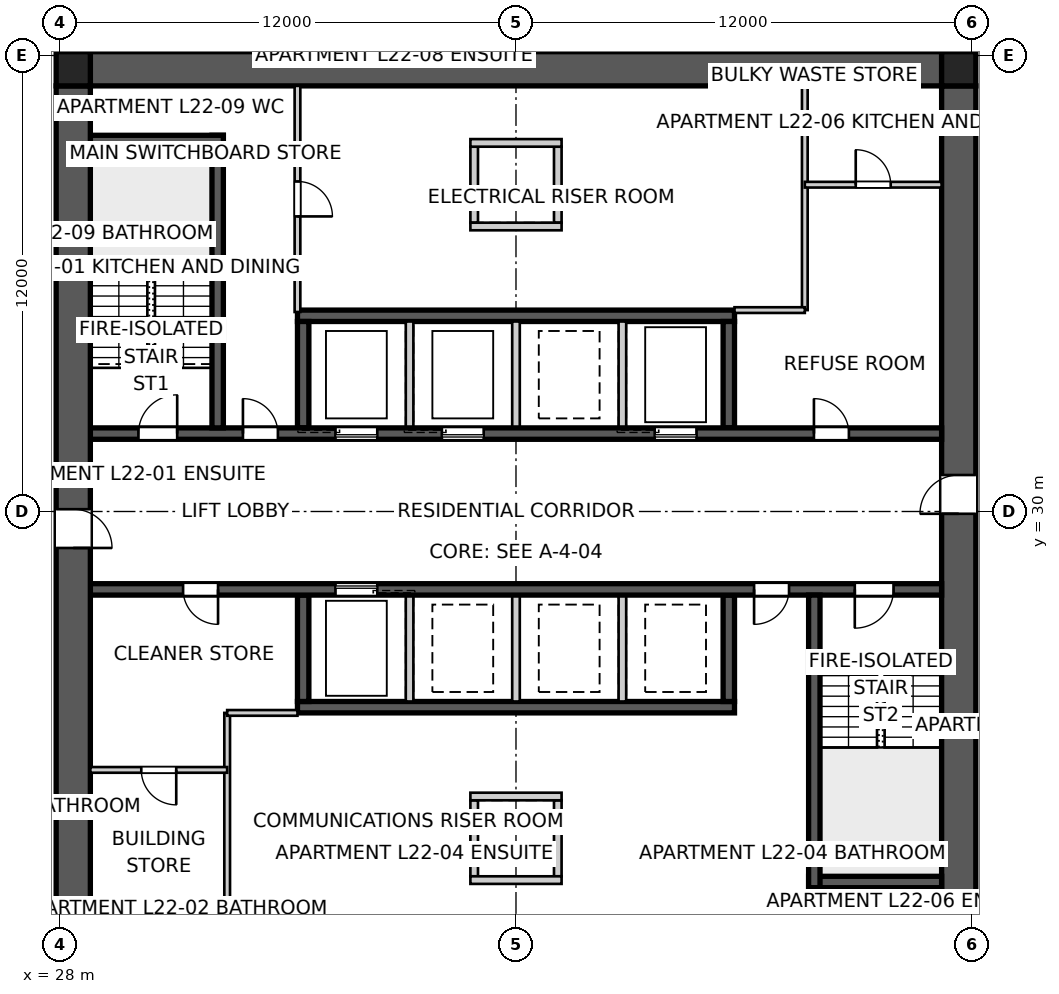
"""IFC4 building model, lengths in metres.
Left out: names, types, materials, properties, quantities, classifications, styles, units other than length and angle.
Written with IfcOpenShell. Run it as: python <this file> out.ifc"""

import sys

from ifc_helpers import new_model, si_unit, direction, frame, frame_2d, origin, origin_2d, place, context, subcontext, project, spatial, polyline, rectangle, outline, extrude, element, fill, save


model = new_model("IFC4")
c1 = context("Model", 3, precision=1e-05, world=origin(), true_north=direction((0.0, 1.0)))
c2 = subcontext(c1, "Body", "Model", "MODEL_VIEW")
j1 = project(units=[si_unit("LENGTHUNIT", "METRE"), si_unit("PLANEANGLEUNIT", "RADIAN")], contexts=[c1])
p1 = place(None, origin())
s1 = spatial("IfcSite", under=j1, at=p1, CompositionType="ELEMENT")
p2 = place(p1, origin())
s2 = spatial("IfcBuilding", under=s1, at=p2, CompositionType="ELEMENT")
p3 = place(p2, frame((0.0, 0.0, 82.8)))
s3 = spatial("IfcBuildingStorey", under=s2, at=p3, CompositionType="ELEMENT", Elevation=82.8)
p4 = place(p3, frame((28.8, 41.65, 0.0), z_axis=(0.0, 0.0, 1.0), x_axis=(1.0, 0.0, 0.0)))
e1 = element("IfcWall", 1, at=p4, inside=s3, PredefinedType="SHEAR", context=c2, shape_type="SweptSolid", body=[
    extrude(outline(polyline([(0.0, -0.45), (22.4, -0.45), (22.4, -0.025), (22.85, -0.025), (22.85, 0.025), (22.4, 0.025), (22.4, 0.45), (0.0, 0.45), (0.0, 0.025), (-0.45, 0.025), (-0.45, -0.025), (0.0, -0.025), (0.0, -0.45)])), origin(), (0.0, 0.0, 1.0), 3.4),
])
p5 = place(p3, frame((51.65, 18.8, 0.0), z_axis=(0.0, 0.0, 1.0), x_axis=(0.0, 1.0, 0.0)))
e2 = element("IfcWall", 2, at=p5, inside=s3, PredefinedType="SHEAR", context=c2, shape_type="SweptSolid", body=[
    extrude(outline(polyline([(0.0, -0.45), (22.4, -0.45), (22.4, -0.025), (22.85, -0.025), (22.85, 0.025), (22.4, 0.025), (22.4, 0.45), (0.0, 0.45), (0.0, 0.025), (-0.45, 0.025), (-0.45, -0.025), (0.0, -0.025), (0.0, -0.45)])), origin(), (0.0, 0.0, 1.0), 3.4),
])
p6 = place(p5, frame((11.14, 0.0, 0.0)))
e3 = element("IfcOpeningElement", 3, at=p6, cuts=e2, PredefinedType="OPENING", context=c2, shape_type="SweptSolid", body=[
    extrude(rectangle(XDim=1.02, YDim=2.4, at=frame_2d((0.51, 1.2))), frame((0.0, 0.46, 0.0), z_axis=(0.0, -1.0, 0.0), x_axis=(1.0, 0.0, 0.0)), (0.0, 0.0, 1.0), 0.92),
])
p7 = place(p3, frame((28.35, 41.2, 0.0), z_axis=(0.0, 0.0, 1.0), x_axis=(0.0, -1.0, 0.0)))
e4 = element("IfcWall", 4, at=p7, inside=s3, PredefinedType="SHEAR", context=c2, shape_type="SweptSolid", body=[
    extrude(outline(polyline([(0.0, -0.45), (22.4, -0.45), (22.4, -0.025), (22.85, -0.025), (22.85, 0.025), (22.4, 0.025), (22.4, 0.45), (0.0, 0.45), (0.0, 0.025), (-0.45, 0.025), (-0.45, -0.025), (0.0, -0.025), (0.0, -0.45)])), origin(), (0.0, 0.0, 1.0), 3.4),
])
p8 = place(p7, frame((11.14, 0.0, 0.0)))
e5 = element("IfcOpeningElement", 5, at=p8, cuts=e4, PredefinedType="OPENING", context=c2, shape_type="SweptSolid", body=[
    extrude(rectangle(XDim=1.02, YDim=2.4, at=frame_2d((0.51, 1.2))), frame((0.0, 0.46, 0.0), z_axis=(0.0, -1.0, 0.0), x_axis=(1.0, 0.0, 0.0)), (0.0, 0.0, 1.0), 0.92),
])
p9 = place(p3, frame((28.8, 32.05, 0.0), z_axis=(0.0, 0.0, 1.0), x_axis=(1.0, 0.0, 0.0)))
e6 = element("IfcWall", 6, at=p9, inside=s3, PredefinedType="SHEAR", context=c2, shape_type="SweptSolid", body=[
    extrude(rectangle(XDim=22.4, YDim=0.3, at=frame_2d((11.2, 0.0))), origin(), (0.0, 0.0, 1.0), 3.4),
])
p10 = place(p9, frame((19.04, 0.0, 0.0)))
e7 = element("IfcOpeningElement", 7, at=p10, cuts=e6, PredefinedType="OPENING", context=c2, shape_type="SweptSolid", body=[
    extrude(rectangle(XDim=0.92, YDim=2.1, at=frame_2d((0.46, 1.05))), frame((0.0, 0.16, 0.0), z_axis=(0.0, -1.0, 0.0), x_axis=(1.0, 0.0, 0.0)), (0.0, 0.0, 1.0), 0.32),
])
p11 = place(p9, frame((1.265, 0.0, 0.0)))
e8 = element("IfcOpeningElement", 8, at=p11, cuts=e6, PredefinedType="OPENING", context=c2, shape_type="SweptSolid", body=[
    extrude(rectangle(XDim=1.02, YDim=2.1, at=frame_2d((0.51, 1.05))), frame((0.0, 0.16, 0.0), z_axis=(0.0, -1.0, 0.0), x_axis=(1.0, 0.0, 0.0)), (0.0, 0.0, 1.0), 0.32),
])
p12 = place(p9, frame((4.015, 0.0, 0.0)))
e9 = element("IfcOpeningElement", 9, at=p12, cuts=e6, PredefinedType="OPENING", context=c2, shape_type="SweptSolid", body=[
    extrude(rectangle(XDim=0.92, YDim=2.1, at=frame_2d((0.46, 1.05))), frame((0.0, 0.16, 0.0), z_axis=(0.0, -1.0, 0.0), x_axis=(1.0, 0.0, 0.0)), (0.0, 0.0, 1.0), 0.32),
])
p13 = place(p9, frame((6.45, 0.0, 0.0)))
e10 = element("IfcOpeningElement", 10, at=p13, cuts=e6, PredefinedType="OPENING", context=c2, shape_type="SweptSolid", body=[
    extrude(rectangle(XDim=1.1, YDim=2.1, at=frame_2d((0.55, 1.05))), frame((0.0, 0.16, 0.0), z_axis=(0.0, -1.0, 0.0), x_axis=(1.0, 0.0, 0.0)), (0.0, 0.0, 1.0), 0.32),
])
p14 = place(p9, frame((9.25, 0.0, 0.0)))
e11 = element("IfcOpeningElement", 11, at=p14, cuts=e6, PredefinedType="OPENING", context=c2, shape_type="SweptSolid", body=[
    extrude(rectangle(XDim=1.1, YDim=2.1, at=frame_2d((0.55, 1.05))), frame((0.0, 0.16, 0.0), z_axis=(0.0, -1.0, 0.0), x_axis=(1.0, 0.0, 0.0)), (0.0, 0.0, 1.0), 0.32),
])
p15 = place(p9, frame((14.85, 0.0, 0.0)))
e12 = element("IfcOpeningElement", 12, at=p15, cuts=e6, PredefinedType="OPENING", context=c2, shape_type="SweptSolid", body=[
    extrude(rectangle(XDim=1.1, YDim=2.1, at=frame_2d((0.55, 1.05))), frame((0.0, 0.16, 0.0), z_axis=(0.0, -1.0, 0.0), x_axis=(1.0, 0.0, 0.0)), (0.0, 0.0, 1.0), 0.32),
])
p16 = place(p3, frame((51.2, 27.95, 0.0), z_axis=(0.0, 0.0, 1.0), x_axis=(-1.0, 0.0, 0.0)))
e13 = element("IfcWall", 13, at=p16, inside=s3, PredefinedType="SHEAR", context=c2, shape_type="SweptSolid", body=[
    extrude(rectangle(XDim=22.4, YDim=0.3, at=frame_2d((11.2, 0.0))), origin(), (0.0, 0.0, 1.0), 3.4),
])
p17 = place(p16, frame((19.04, 0.0, 0.0)))
e14 = element("IfcOpeningElement", 14, at=p17, cuts=e13, PredefinedType="OPENING", context=c2, shape_type="SweptSolid", body=[
    extrude(rectangle(XDim=0.92, YDim=2.1, at=frame_2d((0.46, 1.05))), frame((0.0, 0.16, 0.0), z_axis=(0.0, -1.0, 0.0), x_axis=(1.0, 0.0, 0.0)), (0.0, 0.0, 1.0), 0.32),
])
p18 = place(p16, frame((1.265, 0.0, 0.0)))
e15 = element("IfcOpeningElement", 15, at=p18, cuts=e13, PredefinedType="OPENING", context=c2, shape_type="SweptSolid", body=[
    extrude(rectangle(XDim=1.02, YDim=2.1, at=frame_2d((0.51, 1.05))), frame((0.0, 0.16, 0.0), z_axis=(0.0, -1.0, 0.0), x_axis=(1.0, 0.0, 0.0)), (0.0, 0.0, 1.0), 0.32),
])
p19 = place(p16, frame((4.015, 0.0, 0.0)))
e16 = element("IfcOpeningElement", 16, at=p19, cuts=e13, PredefinedType="OPENING", context=c2, shape_type="SweptSolid", body=[
    extrude(rectangle(XDim=0.92, YDim=2.1, at=frame_2d((0.46, 1.05))), frame((0.0, 0.16, 0.0), z_axis=(0.0, -1.0, 0.0), x_axis=(1.0, 0.0, 0.0)), (0.0, 0.0, 1.0), 0.32),
])
p20 = place(p16, frame((14.85, 0.0, 0.0)))
e17 = element("IfcOpeningElement", 17, at=p20, cuts=e13, PredefinedType="OPENING", context=c2, shape_type="SweptSolid", body=[
    extrude(rectangle(XDim=1.1, YDim=2.1, at=frame_2d((0.55, 1.05))), frame((0.0, 0.16, 0.0), z_axis=(0.0, -1.0, 0.0), x_axis=(1.0, 0.0, 0.0)), (0.0, 0.0, 1.0), 0.32),
])
for number, where, z_axis, x_axis in (
    (18, (34.25, 35.15, 0.0), (0.0, 0.0, 1.0), (1.0, 0.0, 0.0)),
    (19, (45.75, 24.85, 0.0), (0.0, 0.0, 1.0), (-1.0, 0.0, 0.0)),
):
    element("IfcWall", number, at=place(p3, frame(where, z_axis=z_axis, x_axis=x_axis)), inside=s3, PredefinedType="SHEAR", context=c2, shape_type="SweptSolid", body=[
        extrude(rectangle(XDim=11.5, YDim=0.3, at=frame_2d((5.75, 0.0))), origin(), (0.0, 0.0, 1.0), 3.4),
    ])
for number, where, z_axis, x_axis in (
    (20, (34.4, 32.2, 0.0), (0.0, 0.0, 1.0), (0.0, 1.0, 0.0)),
    (21, (45.6, 27.8, 0.0), (0.0, 0.0, 1.0), (0.0, -1.0, 0.0)),
):
    element("IfcWall", number, at=place(p3, frame(where, z_axis=z_axis, x_axis=x_axis)), inside=s3, PredefinedType="SHEAR", context=c2, shape_type="SweptSolid", body=[
        extrude(rectangle(XDim=2.8, YDim=0.3, at=frame_2d((1.4, 0.0))), origin(), (0.0, 0.0, 1.0), 3.4),
    ])
for number, where, z_axis, x_axis in (
    (22, (37.2, 32.2, 0.0), (0.0, 0.0, 1.0), (0.0, 1.0, 0.0)),
    (23, (42.8, 27.8, 0.0), (0.0, 0.0, 1.0), (0.0, -1.0, 0.0)),
    (24, (40.0, 32.2, 0.0), (0.0, 0.0, 1.0), (0.0, 1.0, 0.0)),
    (25, (40.0, 27.8, 0.0), (0.0, 0.0, 1.0), (0.0, -1.0, 0.0)),
    (26, (42.8, 32.2, 0.0), (0.0, 0.0, 1.0), (0.0, 1.0, 0.0)),
    (27, (37.2, 27.8, 0.0), (0.0, 0.0, 1.0), (0.0, -1.0, 0.0)),
):
    element("IfcWall", number, at=place(p3, frame(where, z_axis=z_axis, x_axis=x_axis)), inside=s3, PredefinedType="SOLIDWALL", context=c2, shape_type="SweptSolid", body=[
        extrude(rectangle(XDim=2.8, YDim=0.2, at=frame_2d((1.4, 0.0))), origin(), (0.0, 0.0, 1.0), 3.4),
    ])
for number, where, z_axis, x_axis in (
    (28, (45.6, 32.2, 0.0), (0.0, 0.0, 1.0), (0.0, 1.0, 0.0)),
    (29, (34.4, 27.8, 0.0), (0.0, 0.0, 1.0), (0.0, -1.0, 0.0)),
):
    element("IfcWall", number, at=place(p3, frame(where, z_axis=z_axis, x_axis=x_axis)), inside=s3, PredefinedType="SHEAR", context=c2, shape_type="SweptSolid", body=[
        extrude(rectangle(XDim=2.8, YDim=0.3, at=frame_2d((1.4, 0.0))), origin(), (0.0, 0.0, 1.0), 3.4),
    ])
p21 = place(p3, frame((32.15, 32.2, 0.0), z_axis=(0.0, 0.0, 1.0), x_axis=(0.0, 1.0, 0.0)))
e30 = element("IfcWall", 30, at=p21, inside=s3, PredefinedType="SHEAR", context=c2, shape_type="SweptSolid", body=[
    extrude(rectangle(XDim=7.7, YDim=0.3, at=frame_2d((3.85, 0.0))), origin(), (0.0, 0.0, 1.0), 3.4),
])
p22 = place(p3, frame((28.8, 39.75, 0.0), z_axis=(0.0, 0.0, 1.0), x_axis=(1.0, 0.0, 0.0)))
e31 = element("IfcWall", 31, at=p22, inside=s3, PredefinedType="SHEAR", context=c2, shape_type="SweptSolid", body=[
    extrude(rectangle(XDim=3.5, YDim=0.3, at=frame_2d((1.75, 0.0))), origin(), (0.0, 0.0, 1.0), 3.4),
])
p23 = place(p3, frame((47.85, 27.8, 0.0), z_axis=(0.0, 0.0, 1.0), x_axis=(0.0, -1.0, 0.0)))
e32 = element("IfcWall", 32, at=p23, inside=s3, PredefinedType="SHEAR", context=c2, shape_type="SweptSolid", body=[
    extrude(rectangle(XDim=7.7, YDim=0.3, at=frame_2d((3.85, 0.0))), origin(), (0.0, 0.0, 1.0), 3.4),
])
p24 = place(p3, frame((51.2, 20.25, 0.0), z_axis=(0.0, 0.0, 1.0), x_axis=(-1.0, 0.0, 0.0)))
e33 = element("IfcWall", 33, at=p24, inside=s3, PredefinedType="SHEAR", context=c2, shape_type="SweptSolid", body=[
    extrude(rectangle(XDim=3.5, YDim=0.3, at=frame_2d((1.75, 0.0))), origin(), (0.0, 0.0, 1.0), 3.4),
])
for number, where, z_axis, x_axis in (
    (34, (38.9, 37.6, 0.0), (0.0, 0.0, 1.0), (0.0, 1.0, 0.0)),
    (35, (41.1, 37.6, 0.0), (0.0, 0.0, 1.0), (0.0, 1.0, 0.0)),
):
    element("IfcWall", number, at=place(p3, frame(where, z_axis=z_axis, x_axis=x_axis)), inside=s3, PredefinedType="SOLIDWALL", context=c2, shape_type="SweptSolid", body=[
        extrude(rectangle(XDim=2.0, YDim=0.2, at=frame_2d((1.0, 0.0))), origin(), (0.0, 0.0, 1.0), 3.4),
    ])
for number, where, z_axis, x_axis in (
    (36, (38.8, 37.5, 0.0), (0.0, 0.0, 1.0), (1.0, 0.0, 0.0)),
    (37, (38.8, 39.7, 0.0), (0.0, 0.0, 1.0), (1.0, 0.0, 0.0)),
):
    element("IfcWall", number, at=place(p3, frame(where, z_axis=z_axis, x_axis=x_axis)), inside=s3, PredefinedType="SOLIDWALL", context=c2, shape_type="SweptSolid", body=[
        extrude(rectangle(XDim=2.4, YDim=0.2, at=frame_2d((1.2, 0.0))), origin(), (0.0, 0.0, 1.0), 3.4),
    ])
for number, where, z_axis, x_axis in (
    (38, (38.9, 22.4, 0.0), (0.0, 0.0, 1.0), (0.0, -1.0, 0.0)),
    (39, (41.1, 22.4, 0.0), (0.0, 0.0, 1.0), (0.0, -1.0, 0.0)),
):
    element("IfcWall", number, at=place(p3, frame(where, z_axis=z_axis, x_axis=x_axis)), inside=s3, PredefinedType="SOLIDWALL", context=c2, shape_type="SweptSolid", body=[
        extrude(rectangle(XDim=2.0, YDim=0.2, at=frame_2d((1.0, 0.0))), origin(), (0.0, 0.0, 1.0), 3.4),
    ])
for number, where, z_axis, x_axis in (
    (40, (38.8, 22.5, 0.0), (0.0, 0.0, 1.0), (1.0, 0.0, 0.0)),
    (41, (38.8, 20.3, 0.0), (0.0, 0.0, 1.0), (1.0, 0.0, 0.0)),
):
    element("IfcWall", number, at=place(p3, frame(where, z_axis=z_axis, x_axis=x_axis)), inside=s3, PredefinedType="SOLIDWALL", context=c2, shape_type="SweptSolid", body=[
        extrude(rectangle(XDim=2.4, YDim=0.2, at=frame_2d((1.2, 0.0))), origin(), (0.0, 0.0, 1.0), 3.4),
    ])
for number, where, z_axis, x_axis in (
    (42, (51.65, 41.65, 0.0), (0.0, 0.0, 1.0), (1.0, 0.0, 0.0)),
    (43, (28.35, 41.65, 0.0), (0.0, 0.0, 1.0), (1.0, 0.0, 0.0)),
):
    element("IfcColumn", number, at=place(p3, frame(where, z_axis=z_axis, x_axis=x_axis)), inside=s3, PredefinedType="COLUMN", context=c2, shape_type="SweptSolid", body=[
        extrude(rectangle(XDim=0.9, YDim=0.9, at=origin_2d()), origin(), (0.0, 0.0, 1.0), 3.4),
    ])
p25 = place(p3, frame((34.25, 41.2, 0.0), z_axis=(0.0, 0.0, 1.0), x_axis=(0.0, -1.0, 0.0)))
e44 = element("IfcWall", 44, at=p25, inside=s3, PredefinedType="SOLIDWALL", context=c2, shape_type="SweptSolid", body=[
    extrude(rectangle(XDim=5.95, YDim=0.15, at=frame_2d((2.975, 0.0))), origin(), (0.0, 0.0, 1.0), 3.25),
])
p26 = place(p25, frame((2.515, 0.0, 0.0)))
e45 = element("IfcOpeningElement", 45, at=p26, cuts=e44, PredefinedType="OPENING", context=c2, shape_type="SweptSolid", body=[
    extrude(rectangle(XDim=0.92, YDim=2.1, at=frame_2d((0.46, 1.05))), frame((0.0, 0.085, 0.0), z_axis=(0.0, -1.0, 0.0), x_axis=(1.0, 0.0, 0.0)), (0.0, 0.0, 1.0), 0.17),
])
p27 = place(p3, frame((47.6, 41.2, 0.0), z_axis=(0.0, 0.0, 1.0), x_axis=(0.0, -1.0, 0.0)))
e46 = element("IfcWall", 46, at=p27, inside=s3, PredefinedType="SOLIDWALL", context=c2, shape_type="SweptSolid", body=[
    extrude(rectangle(XDim=5.9, YDim=0.15, at=frame_2d((2.95, 0.0))), origin(), (0.0, 0.0, 1.0), 3.25),
])
p28 = place(p3, frame((47.6, 35.3, 0.0), z_axis=(0.0, 0.0, 1.0), x_axis=(-1.0, 0.0, 0.0)))
e47 = element("IfcWall", 47, at=p28, inside=s3, PredefinedType="SOLIDWALL", context=c2, shape_type="SweptSolid", body=[
    extrude(rectangle(XDim=1.85, YDim=0.15, at=frame_2d((0.925, 0.0))), origin(), (0.0, 0.0, 1.0), 3.25),
])
p29 = place(p3, frame((47.6, 38.6, 0.0), z_axis=(0.0, 0.0, 1.0), x_axis=(1.0, 0.0, 0.0)))
e48 = element("IfcWall", 48, at=p29, inside=s3, PredefinedType="SOLIDWALL", context=c2, shape_type="SweptSolid", body=[
    extrude(rectangle(XDim=3.6, YDim=0.15, at=frame_2d((1.8, 0.0))), origin(), (0.0, 0.0, 1.0), 3.25),
])
p30 = place(p29, frame((1.34, 0.0, 0.0)))
e49 = element("IfcOpeningElement", 49, at=p30, cuts=e48, PredefinedType="OPENING", context=c2, shape_type="SweptSolid", body=[
    extrude(rectangle(XDim=0.92, YDim=2.1, at=frame_2d((0.46, 1.05))), frame((0.0, 0.085, 0.0), z_axis=(0.0, -1.0, 0.0), x_axis=(1.0, 0.0, 0.0)), (0.0, 0.0, 1.0), 0.17),
])
p31 = place(p3, frame((32.4, 18.8, 0.0), z_axis=(0.0, 0.0, 1.0), x_axis=(0.0, 1.0, 0.0)))
e50 = element("IfcWall", 50, at=p31, inside=s3, PredefinedType="SOLIDWALL", context=c2, shape_type="SweptSolid", body=[
    extrude(rectangle(XDim=5.9, YDim=0.15, at=frame_2d((2.95, 0.0))), origin(), (0.0, 0.0, 1.0), 3.25),
])
p32 = place(p3, frame((32.4, 24.7, 0.0), z_axis=(0.0, 0.0, 1.0), x_axis=(1.0, 0.0, 0.0)))
e51 = element("IfcWall", 51, at=p32, inside=s3, PredefinedType="SOLIDWALL", context=c2, shape_type="SweptSolid", body=[
    extrude(rectangle(XDim=1.85, YDim=0.15, at=frame_2d((0.925, 0.0))), origin(), (0.0, 0.0, 1.0), 3.25),
])
p33 = place(p3, frame((32.4, 23.2, 0.0), z_axis=(0.0, 0.0, 1.0), x_axis=(-1.0, 0.0, 0.0)))
e52 = element("IfcWall", 52, at=p33, inside=s3, PredefinedType="SOLIDWALL", context=c2, shape_type="SweptSolid", body=[
    extrude(rectangle(XDim=3.6, YDim=0.15, at=frame_2d((1.8, 0.0))), origin(), (0.0, 0.0, 1.0), 3.25),
])
p34 = place(p33, frame((1.34, 0.0, 0.0)))
e53 = element("IfcOpeningElement", 53, at=p34, cuts=e52, PredefinedType="OPENING", context=c2, shape_type="SweptSolid", body=[
    extrude(rectangle(XDim=0.92, YDim=2.1, at=frame_2d((0.46, 1.05))), frame((0.0, 0.085, 0.0), z_axis=(0.0, -1.0, 0.0), x_axis=(1.0, 0.0, 0.0)), (0.0, 0.0, 1.0), 0.17),
])
p35 = place(p10, origin())
e54 = element("IfcDoor", 54, at=p35, inside=s3, OperationType="SINGLE_SWING_LEFT", PredefinedType="DOOR", context=c2, shape_type="SweptSolid", body=[
    extrude(rectangle(XDim=0.92, YDim=2.1, at=frame_2d((0.46, 1.05))), frame((0.0, 0.025, 0.0), z_axis=(0.0, -1.0, 0.0), x_axis=(1.0, 0.0, 0.0)), (0.0, 0.0, 1.0), 0.05),
])
fill(e7, e54)
p36 = place(p17, origin())
e55 = element("IfcDoor", 55, at=p36, inside=s3, OperationType="SINGLE_SWING_LEFT", PredefinedType="DOOR", context=c2, shape_type="SweptSolid", body=[
    extrude(rectangle(XDim=0.92, YDim=2.1, at=frame_2d((0.46, 1.05))), frame((0.0, 0.025, 0.0), z_axis=(0.0, -1.0, 0.0), x_axis=(1.0, 0.0, 0.0)), (0.0, 0.0, 1.0), 0.05),
])
fill(e14, e55)
p37 = place(p18, origin())
e56 = element("IfcDoor", 56, at=p37, inside=s3, OperationType="SINGLE_SWING_RIGHT", PredefinedType="DOOR", context=c2, shape_type="SweptSolid", body=[
    extrude(rectangle(XDim=1.02, YDim=2.1, at=frame_2d((0.51, 1.05))), frame((0.0, 0.025, 0.0), z_axis=(0.0, -1.0, 0.0), x_axis=(1.0, 0.0, 0.0)), (0.0, 0.0, 1.0), 0.05),
])
fill(e15, e56)
p38 = place(p11, origin())
e57 = element("IfcDoor", 57, at=p38, inside=s3, OperationType="SINGLE_SWING_RIGHT", PredefinedType="DOOR", context=c2, shape_type="SweptSolid", body=[
    extrude(rectangle(XDim=1.02, YDim=2.1, at=frame_2d((0.51, 1.05))), frame((0.0, 0.025, 0.0), z_axis=(0.0, -1.0, 0.0), x_axis=(1.0, 0.0, 0.0)), (0.0, 0.0, 1.0), 0.05),
])
fill(e8, e57)
p39 = place(p12, origin())
e58 = element("IfcDoor", 58, at=p39, inside=s3, OperationType="SINGLE_SWING_LEFT", PredefinedType="DOOR", context=c2, shape_type="SweptSolid", body=[
    extrude(rectangle(XDim=0.92, YDim=2.1, at=frame_2d((0.46, 1.05))), frame((0.0, 0.025, 0.0), z_axis=(0.0, -1.0, 0.0), x_axis=(1.0, 0.0, 0.0)), (0.0, 0.0, 1.0), 0.05),
])
fill(e9, e58)
p40 = place(p19, origin())
e59 = element("IfcDoor", 59, at=p40, inside=s3, OperationType="SINGLE_SWING_RIGHT", PredefinedType="DOOR", context=c2, shape_type="SweptSolid", body=[
    extrude(rectangle(XDim=0.92, YDim=2.1, at=frame_2d((0.46, 1.05))), frame((0.0, 0.025, 0.0), z_axis=(0.0, -1.0, 0.0), x_axis=(1.0, 0.0, 0.0)), (0.0, 0.0, 1.0), 0.05),
])
fill(e16, e59)
p41 = place(p30, origin())
e60 = element("IfcDoor", 60, at=p41, inside=s3, OperationType="SINGLE_SWING_LEFT", PredefinedType="DOOR", context=c2, shape_type="SweptSolid", body=[
    extrude(rectangle(XDim=0.92, YDim=2.1, at=frame_2d((0.46, 1.05))), frame((0.0, 0.025, 0.0), z_axis=(0.0, -1.0, 0.0), x_axis=(1.0, 0.0, 0.0)), (0.0, 0.0, 1.0), 0.05),
])
fill(e49, e60)
p42 = place(p34, origin())
e61 = element("IfcDoor", 61, at=p42, inside=s3, OperationType="SINGLE_SWING_LEFT", PredefinedType="DOOR", context=c2, shape_type="SweptSolid", body=[
    extrude(rectangle(XDim=0.92, YDim=2.1, at=frame_2d((0.46, 1.05))), frame((0.0, 0.025, 0.0), z_axis=(0.0, -1.0, 0.0), x_axis=(1.0, 0.0, 0.0)), (0.0, 0.0, 1.0), 0.05),
])
fill(e53, e61)
p43 = place(p26, origin())
e62 = element("IfcDoor", 62, at=p43, inside=s3, OperationType="SINGLE_SWING_RIGHT", PredefinedType="DOOR", context=c2, shape_type="SweptSolid", body=[
    extrude(rectangle(XDim=0.92, YDim=2.1, at=frame_2d((0.46, 1.05))), frame((0.0, 0.025, 0.0), z_axis=(0.0, -1.0, 0.0), x_axis=(1.0, 0.0, 0.0)), (0.0, 0.0, 1.0), 0.05),
])
fill(e45, e62)
p44 = place(p6, origin())
e63 = element("IfcDoor", 63, at=p44, inside=s3, OperationType="SINGLE_SWING_LEFT", PredefinedType="DOOR", context=c2, shape_type="SweptSolid", body=[
    extrude(rectangle(XDim=1.02, YDim=2.4, at=frame_2d((0.51, 1.2))), frame((0.0, 0.025, 0.0), z_axis=(0.0, -1.0, 0.0), x_axis=(1.0, 0.0, 0.0)), (0.0, 0.0, 1.0), 0.05),
])
fill(e3, e63)
p45 = place(p8, origin())
e64 = element("IfcDoor", 64, at=p45, inside=s3, OperationType="SINGLE_SWING_RIGHT", PredefinedType="DOOR", context=c2, shape_type="SweptSolid", body=[
    extrude(rectangle(XDim=1.02, YDim=2.4, at=frame_2d((0.51, 1.2))), frame((0.0, 0.025, 0.0), z_axis=(0.0, -1.0, 0.0), x_axis=(1.0, 0.0, 0.0)), (0.0, 0.0, 1.0), 0.05),
])
fill(e5, e64)
p46 = place(p13, origin())
e65 = element("IfcDoor", 65, at=p46, inside=s3, OperationType="SLIDING_TO_LEFT", PredefinedType="DOOR", context=c2, shape_type="SweptSolid", body=[
    extrude(rectangle(XDim=1.1, YDim=2.1, at=frame_2d((0.55, 1.05))), frame((0.0, 0.025, 0.0), z_axis=(0.0, -1.0, 0.0), x_axis=(1.0, 0.0, 0.0)), (0.0, 0.0, 1.0), 0.05),
])
fill(e10, e65)
p47 = place(p14, origin())
e66 = element("IfcDoor", 66, at=p47, inside=s3, OperationType="SLIDING_TO_LEFT", PredefinedType="DOOR", context=c2, shape_type="SweptSolid", body=[
    extrude(rectangle(XDim=1.1, YDim=2.1, at=frame_2d((0.55, 1.05))), frame((0.0, 0.025, 0.0), z_axis=(0.0, -1.0, 0.0), x_axis=(1.0, 0.0, 0.0)), (0.0, 0.0, 1.0), 0.05),
])
fill(e11, e66)
p48 = place(p15, origin())
e67 = element("IfcDoor", 67, at=p48, inside=s3, OperationType="SLIDING_TO_LEFT", PredefinedType="DOOR", context=c2, shape_type="SweptSolid", body=[
    extrude(rectangle(XDim=1.1, YDim=2.1, at=frame_2d((0.55, 1.05))), frame((0.0, 0.025, 0.0), z_axis=(0.0, -1.0, 0.0), x_axis=(1.0, 0.0, 0.0)), (0.0, 0.0, 1.0), 0.05),
])
fill(e12, e67)
p49 = place(p20, origin())
e68 = element("IfcDoor", 68, at=p49, inside=s3, OperationType="SLIDING_TO_LEFT", PredefinedType="DOOR", context=c2, shape_type="SweptSolid", body=[
    extrude(rectangle(XDim=1.1, YDim=2.1, at=frame_2d((0.55, 1.05))), frame((0.0, 0.025, 0.0), z_axis=(0.0, -1.0, 0.0), x_axis=(1.0, 0.0, 0.0)), (0.0, 0.0, 1.0), 0.05),
])
fill(e17, e68)
save(model, sys.argv[1])
